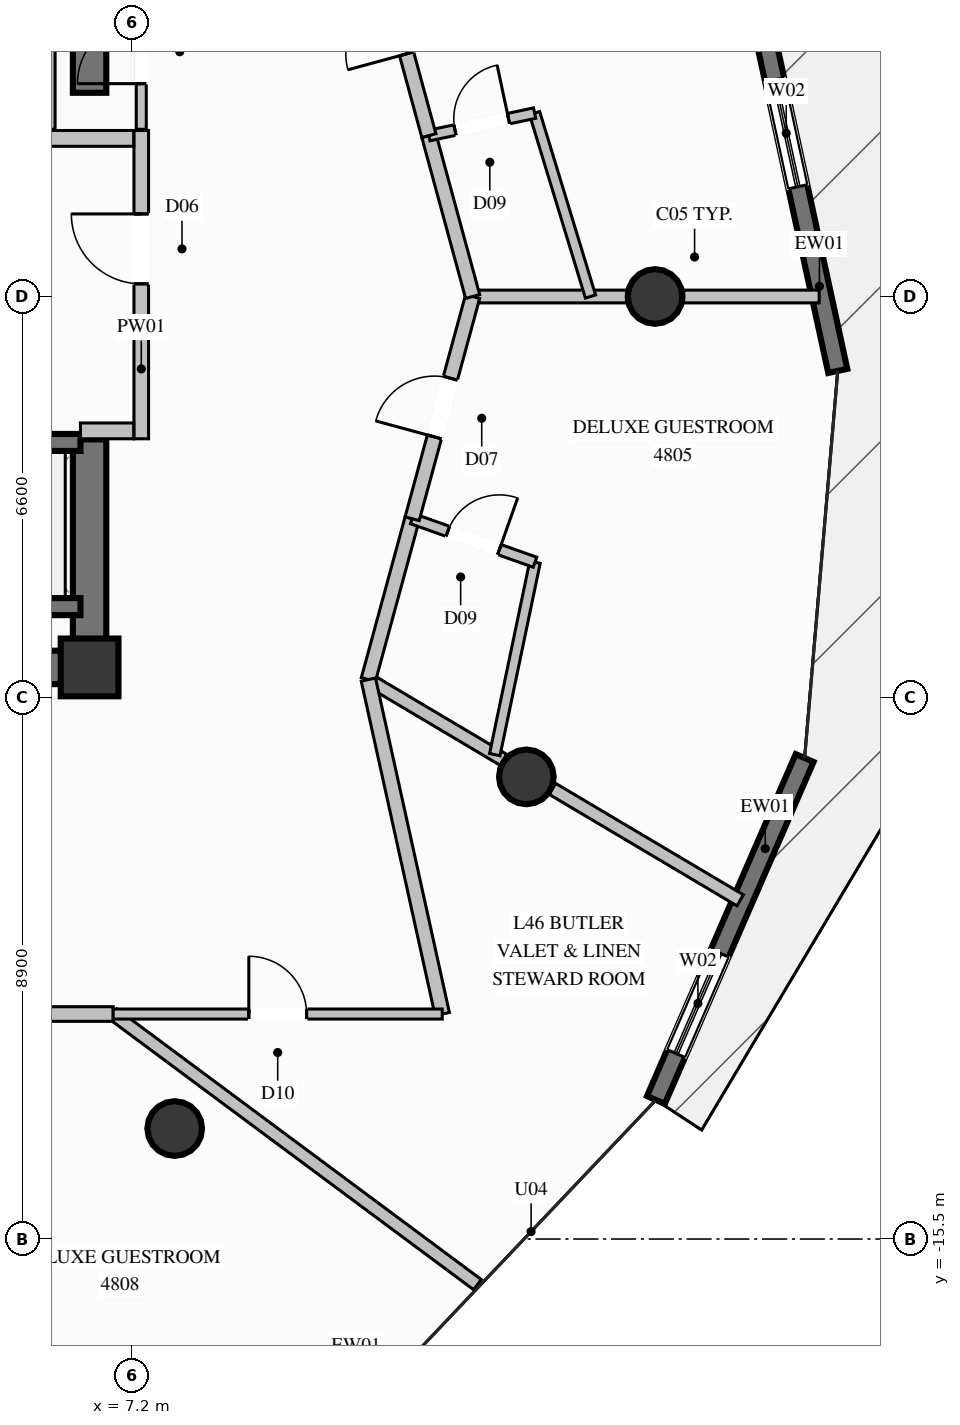
"""IFC4 building model, lengths in metres.
Left out: names, types, materials, properties, quantities, classifications, styles, units other than length and angle.
Written with IfcOpenShell. Run it as: python <this file> out.ifc"""

import sys

from ifc_helpers import new_model, si_unit, direction, frame, frame_2d, origin, origin_2d, place, context, subcontext, project, spatial, rectangle, circle, extrude, element, fill, save


model = new_model("IFC4")
c1 = context("Model", 3, precision=1e-05, world=origin(), true_north=direction((0.0, 1.0)))
c2 = subcontext(c1, "Body", "Model", "MODEL_VIEW")
j1 = project(units=[si_unit("LENGTHUNIT", "METRE"), si_unit("PLANEANGLEUNIT", "RADIAN")], contexts=[c1])
p1 = place(None, origin())
s1 = spatial("IfcSite", under=j1, at=p1, CompositionType="ELEMENT")
p2 = place(p1, origin())
s2 = spatial("IfcBuilding", under=s1, at=p2, CompositionType="ELEMENT")
p3 = place(p2, frame((0.0, 0.0, 180.4)))
s3 = spatial("IfcBuildingStorey", under=s2, at=p3, CompositionType="ELEMENT", Elevation=180.4)
p4 = place(p3, frame((6.5, -6.1, 0.0), z_axis=(0.0, 0.0, 1.0), x_axis=(1.0, 0.0, 0.0)))
e1 = element("IfcColumn", 1, at=p4, inside=s3, PredefinedType="COLUMN", context=c2, shape_type="SweptSolid", body=[
    extrude(rectangle(XDim=0.95, YDim=0.95, at=origin_2d()), origin(), (0.0, 0.0, 1.0), 3.6),
])
p5 = place(p3, frame((4.15, -6.1, 0.0), z_axis=(0.0, 0.0, 1.0), x_axis=(1.0, 0.0, 0.0)))
e2 = element("IfcWall", 2, at=p5, inside=s3, PredefinedType="SHEAR", context=c2, shape_type="SweptSolid", body=[
    extrude(rectangle(XDim=2.075, YDim=0.55, at=frame_2d((1.038, 0.0))), origin(), (0.0, 0.0, 1.0), 3.6),
])
p6 = place(p3, frame((6.5, -6.375, 0.0), z_axis=(0.0, 0.0, 1.0), x_axis=(0.0, 1.0, 0.0)))
e3 = element("IfcWall", 3, at=p6, inside=s3, PredefinedType="SHEAR", context=c2, shape_type="SweptSolid", body=[
    extrude(rectangle(XDim=4.025, YDim=0.55, at=frame_2d((2.012, 0.0))), origin(), (0.0, 0.0, 1.0), 3.6),
])
p7 = place(p3, frame((6.5, 3.35, 0.0), z_axis=(0.0, 0.0, 1.0), x_axis=(0.0, 1.0, 0.0)))
e4 = element("IfcWall", 4, at=p7, inside=s3, PredefinedType="SHEAR", context=c2, shape_type="SweptSolid", body=[
    extrude(rectangle(XDim=3.025, YDim=0.55, at=frame_2d((1.512, 0.0))), origin(), (0.0, 0.0, 1.0), 3.6),
])
for number, where, z_axis, x_axis in (
    (5, (15.8, 0.0, 0.0), (0.0, 0.0, 1.0), (1.0, 0.0, 0.0)),
    (6, (7.9, -13.683, 0.0), (0.0, 0.0, 1.0), (1.0, 0.0, 0.0)),
    (7, (13.683, -7.9, 0.0), (0.0, 0.0, 1.0), (1.0, 0.0, 0.0)),
):
    element("IfcColumn", number, at=place(p3, frame(where, z_axis=z_axis, x_axis=x_axis)), inside=s3, PredefinedType="COLUMN", context=c2, shape_type="SweptSolid", body=[
        extrude(circle(Radius=0.45, at=origin_2d()), origin(), (0.0, 0.0, 1.0), 3.6),
    ])
p8 = place(p3, frame((18.26, -7.59, 0.0), z_axis=(0.0, 0.0, 1.0), x_axis=(-0.398911001453, -0.916989647117, 0.0)))
e8 = element("IfcWall", 8, at=p8, inside=s3, PredefinedType="SOLIDWALL", context=c2, shape_type="SweptSolid", body=[
    extrude(rectangle(XDim=6.132, YDim=0.32, at=frame_2d((3.066, 0.0))), origin(), (0.0, 0.0, 1.0), 3.36),
])
p9 = place(p8, frame((3.5, 0.0, 0.35)))
e9 = element("IfcOpeningElement", 9, at=p9, cuts=e8, PredefinedType="OPENING", context=c2, shape_type="SweptSolid", body=[
    extrude(rectangle(XDim=1.8, YDim=2.6, at=frame_2d((0.9, 1.3))), frame((0.0, 0.17, 0.0), z_axis=(0.0, -1.0, 0.0), x_axis=(1.0, 0.0, 0.0)), (0.0, 0.0, 1.0), 0.34),
])
p10 = place(p3, frame((17.398, 5.262, 0.0), z_axis=(0.0, 0.0, 1.0), x_axis=(0.211992849193, -0.977271217161, 0.0)))
e10 = element("IfcWall", 10, at=p10, inside=s3, PredefinedType="SOLIDWALL", context=c2, shape_type="SweptSolid", body=[
    extrude(rectangle(XDim=6.637, YDim=0.32, at=frame_2d((3.318, 0.0))), origin(), (0.0, 0.0, 1.0), 3.36),
])
p11 = place(p10, frame((1.738, 0.0, 0.35)))
e11 = element("IfcOpeningElement", 11, at=p11, cuts=e10, PredefinedType="OPENING", context=c2, shape_type="SweptSolid", body=[
    extrude(rectangle(XDim=1.8, YDim=2.6, at=frame_2d((0.9, 1.3))), frame((0.0, 0.17, 0.0), z_axis=(0.0, -1.0, 0.0), x_axis=(1.0, 0.0, 0.0)), (0.0, 0.0, 1.0), 0.34),
])
p12 = place(p3, frame((4.15, -5.1, 0.0), z_axis=(0.0, 0.0, 1.0), x_axis=(1.0, 0.0, 0.0)))
e12 = element("IfcWall", 12, at=p12, inside=s3, PredefinedType="SOLIDWALL", context=c2, shape_type="SweptSolid", body=[
    extrude(rectangle(XDim=2.2, YDim=0.28, at=frame_2d((1.1, 0.0))), origin(), (0.0, 0.0, 1.0), 3.36),
])
p13 = place(p3, frame((6.35, -2.4, 0.0), z_axis=(0.0, 0.0, 1.0), x_axis=(-1.0, 0.0, 0.0)))
e13 = element("IfcWall", 13, at=p13, inside=s3, PredefinedType="SOLIDWALL", context=c2, shape_type="SweptSolid", body=[
    extrude(rectangle(XDim=2.2, YDim=0.28, at=frame_2d((1.1, 0.0))), origin(), (0.0, 0.0, 1.0), 3.36),
])
p14 = place(p13, frame((0.5, 0.0, 0.0)))
e14 = element("IfcOpeningElement", 14, at=p14, cuts=e13, PredefinedType="OPENING", context=c2, shape_type="SweptSolid", body=[
    extrude(rectangle(XDim=1.2, YDim=2.2, at=frame_2d((0.6, 1.1))), frame((0.0, 0.15, 0.0), z_axis=(0.0, -1.0, 0.0), x_axis=(1.0, 0.0, 0.0)), (0.0, 0.0, 1.0), 0.3),
])
p15 = place(p3, frame((7.35, -2.34, 0.0), z_axis=(0.0, 0.0, 1.0), x_axis=(0.0, 1.0, 0.0)))
e15 = element("IfcWall", 15, at=p15, inside=s3, PredefinedType="PARTITIONING", context=c2, shape_type="SweptSolid", body=[
    extrude(rectangle(XDim=5.07, YDim=0.24, at=frame_2d((2.535, 0.0))), origin(), (0.0, 0.0, 1.0), 2.445),
])
p16 = place(p15, frame((2.548, 0.0, 0.0)))
e16 = element("IfcOpeningElement", 16, at=p16, cuts=e15, PredefinedType="OPENING", context=c2, shape_type="SweptSolid", body=[
    extrude(rectangle(XDim=1.15, YDim=2.2, at=frame_2d((0.575, 1.1))), frame((0.0, 0.13, 0.0), z_axis=(0.0, -1.0, 0.0), x_axis=(1.0, 0.0, 0.0)), (0.0, 0.0, 1.0), 0.26),
])
p17 = place(p3, frame((6.35, -2.21, 0.0), z_axis=(0.0, 0.0, 1.0), x_axis=(1.0, 0.0, 0.0)))
e17 = element("IfcWall", 17, at=p17, inside=s3, PredefinedType="PARTITIONING", context=c2, shape_type="SweptSolid", body=[
    extrude(rectangle(XDim=0.875, YDim=0.26, at=frame_2d((0.438, 0.0))), origin(), (0.0, 0.0, 1.0), 3.36),
])
p18 = place(p3, frame((4.13, 2.6, 0.0), z_axis=(0.0, 0.0, 1.0), x_axis=(1.0, 0.0, 0.0)))
e18 = element("IfcWall", 18, at=p18, inside=s3, PredefinedType="PARTITIONING", context=c2, shape_type="SweptSolid", body=[
    extrude(rectangle(XDim=3.095, YDim=0.26, at=frame_2d((1.548, 0.0))), origin(), (0.0, 0.0, 1.0), 3.36),
])
p19 = place(p3, frame((7.35, 2.75, 0.0), z_axis=(0.0, 0.0, 1.0), x_axis=(0.0, 1.0, 0.0)))
e19 = element("IfcWall", 19, at=p19, inside=s3, PredefinedType="PARTITIONING", context=c2, shape_type="SweptSolid", body=[
    extrude(rectangle(XDim=2.55, YDim=0.165, at=frame_2d((1.275, 0.0))), origin(), (0.0, 0.0, 1.0), 3.36),
])
p20 = place(p19, frame((0.75, 0.0, 0.0)))
e20 = element("IfcOpeningElement", 20, at=p20, cuts=e19, PredefinedType="OPENING", context=c2, shape_type="SweptSolid", body=[
    extrude(rectangle(XDim=1.05, YDim=2.15, at=frame_2d((0.525, 1.075))), frame((0.0, 0.093, 0.0), z_axis=(0.0, -1.0, 0.0), x_axis=(1.0, 0.0, 0.0)), (0.0, 0.0, 1.0), 0.185),
])
p21 = place(p3, frame((5.85, 5.3, 0.0), z_axis=(0.0, 0.0, 1.0), x_axis=(0.0, -1.0, 0.0)))
e21 = element("IfcWall", 21, at=p21, inside=s3, PredefinedType="PARTITIONING", context=c2, shape_type="SweptSolid", body=[
    extrude(rectangle(XDim=2.55, YDim=0.165, at=frame_2d((1.275, 0.0))), origin(), (0.0, 0.0, 1.0), 2.445),
])
p22 = place(p3, frame((12.8, 0.0, 0.0), z_axis=(0.0, 0.0, 1.0), x_axis=(1.0, 0.0, 0.0)))
e22 = element("IfcWall", 22, at=p22, inside=s3, PredefinedType="PARTITIONING", context=c2, shape_type="SweptSolid", body=[
    extrude(rectangle(XDim=2.53, YDim=0.21, at=frame_2d((1.265, 0.0))), origin(), (0.0, 0.0, 1.0), 3.36),
])
p23 = place(p3, frame((16.27, 0.0, 0.0), z_axis=(0.0, 0.0, 1.0), x_axis=(1.0, 0.0, 0.0)))
e23 = element("IfcWall", 23, at=p23, inside=s3, PredefinedType="PARTITIONING", context=c2, shape_type="SweptSolid", body=[
    extrude(rectangle(XDim=2.229, YDim=0.21, at=frame_2d((1.115, 0.0))), origin(), (0.0, 0.0, 1.0), 3.36),
])
p24 = place(p3, frame((11.085, -6.3, 0.0), z_axis=(0.0, 0.0, 1.0), x_axis=(0.859827513331, -0.510584613281, 0.0)))
e24 = element("IfcWall", 24, at=p24, inside=s3, PredefinedType="PARTITIONING", context=c2, shape_type="SweptSolid", body=[
    extrude(rectangle(XDim=2.583, YDim=0.21, at=frame_2d((1.292, 0.0))), origin(), (0.0, 0.0, 1.0), 2.801),
])
p25 = place(p3, frame((14.11, -8.096, 0.0), z_axis=(0.0, 0.0, 1.0), x_axis=(0.859858473155, -0.510532473153, 0.0)))
e25 = element("IfcWall", 25, at=p25, inside=s3, PredefinedType="PARTITIONING", context=c2, shape_type="SweptSolid", body=[
    extrude(rectangle(XDim=3.592, YDim=0.21, at=frame_2d((1.796, 0.0))), origin(), (0.0, 0.0, 1.0), 3.36),
])
p26 = place(p3, frame((11.085, -6.3, 0.0), z_axis=(0.0, 0.0, 1.0), x_axis=(0.262552356383, 0.964917747872, 0.0)))
e26 = element("IfcWall", 26, at=p26, inside=s3, PredefinedType="PARTITIONING", context=c2, shape_type="SweptSolid", body=[
    extrude(rectangle(XDim=2.742, YDim=0.24, at=frame_2d((1.371, 0.0))), origin(), (0.0, 0.0, 1.0), 3.36),
])
p27 = place(p3, frame((13.164, -7.534, 0.0), z_axis=(0.0, 0.0, 1.0), x_axis=(0.204476064812, 0.978871564057, 0.0)))
e27 = element("IfcWall", 27, at=p27, inside=s3, PredefinedType="PLUMBINGWALL", context=c2, shape_type="SweptSolid", body=[
    extrude(rectangle(XDim=3.232, YDim=0.175, at=frame_2d((1.616, 0.0))), origin(), (0.0, 0.0, 1.0), 2.929),
])
p28 = place(p3, frame((11.805, -3.654, 0.0), z_axis=(0.0, 0.0, 1.0), x_axis=(0.942533085892, -0.334112828248, 0.0)))
e28 = element("IfcWall", 28, at=p28, inside=s3, PredefinedType="PLUMBINGWALL", context=c2, shape_type="SweptSolid", body=[
    extrude(rectangle(XDim=2.143, YDim=0.175, at=frame_2d((1.072, 0.0))), origin(), (0.0, 0.0, 1.0), 3.36),
])
p29 = place(p28, frame((0.622, 0.0, 0.0)))
e29 = element("IfcOpeningElement", 29, at=p29, cuts=e28, PredefinedType="OPENING", context=c2, shape_type="SweptSolid", body=[
    extrude(rectangle(XDim=0.9, YDim=2.1, at=frame_2d((0.45, 1.05))), frame((0.0, 0.098, 0.0), z_axis=(0.0, -1.0, 0.0), x_axis=(1.0, 0.0, 0.0)), (0.0, 0.0, 1.0), 0.195),
])
p30 = place(p3, frame((11.805, -3.654, 0.0), z_axis=(0.0, 0.0, 1.0), x_axis=(0.262762825819, 0.964860454868, 0.0)))
e30 = element("IfcWall", 30, at=p30, inside=s3, PredefinedType="PARTITIONING", context=c2, shape_type="SweptSolid", body=[
    extrude(rectangle(XDim=3.787, YDim=0.24, at=frame_2d((1.894, 0.0))), origin(), (0.0, 0.0, 1.0), 3.36),
])
p31 = place(p30, frame((1.394, 0.0, 0.0)))
e31 = element("IfcOpeningElement", 31, at=p31, cuts=e30, PredefinedType="OPENING", context=c2, shape_type="SweptSolid", body=[
    extrude(rectangle(XDim=1.0, YDim=2.2, at=frame_2d((0.5, 1.1))), frame((0.0, 0.13, 0.0), z_axis=(0.0, -1.0, 0.0), x_axis=(1.0, 0.0, 0.0)), (0.0, 0.0, 1.0), 0.26),
])
p32 = place(p3, frame((12.8, 0.0, 0.0), z_axis=(0.0, 0.0, 1.0), x_axis=(-0.262552356383, 0.964917747872, 0.0)))
e32 = element("IfcWall", 32, at=p32, inside=s3, PredefinedType="PARTITIONING", context=c2, shape_type="SweptSolid", body=[
    extrude(rectangle(XDim=2.742, YDim=0.24, at=frame_2d((1.371, 0.0))), origin(), (0.0, 0.0, 1.0), 3.36),
])
p33 = place(p3, frame((14.738, 0.0, 0.0), z_axis=(0.0, 0.0, 1.0), x_axis=(-0.291451232832, 0.956585688206, 0.0)))
e33 = element("IfcWall", 33, at=p33, inside=s3, PredefinedType="PLUMBINGWALL", context=c2, shape_type="SweptSolid", body=[
    extrude(rectangle(XDim=3.153, YDim=0.175, at=frame_2d((1.577, 0.0))), origin(), (0.0, 0.0, 1.0), 3.36),
])
p34 = place(p3, frame((12.08, 2.646, 0.0), z_axis=(0.0, 0.0, 1.0), x_axis=(0.978092843795, 0.208169135363, 0.0)))
e34 = element("IfcWall", 34, at=p34, inside=s3, PredefinedType="PLUMBINGWALL", context=c2, shape_type="SweptSolid", body=[
    extrude(rectangle(XDim=1.778, YDim=0.175, at=frame_2d((0.889, 0.0))), origin(), (0.0, 0.0, 1.0), 3.36),
])
p35 = place(p34, frame((0.439, 0.0, 0.0)))
e35 = element("IfcOpeningElement", 35, at=p35, cuts=e34, PredefinedType="OPENING", context=c2, shape_type="SweptSolid", body=[
    extrude(rectangle(XDim=0.9, YDim=2.1, at=frame_2d((0.45, 1.05))), frame((0.0, 0.098, 0.0), z_axis=(0.0, -1.0, 0.0), x_axis=(1.0, 0.0, 0.0)), (0.0, 0.0, 1.0), 0.195),
])
p36 = place(p3, frame((12.08, 2.646, 0.0), z_axis=(0.0, 0.0, 1.0), x_axis=(-0.262762825819, 0.964860454868, 0.0)))
e36 = element("IfcWall", 36, at=p36, inside=s3, PredefinedType="PARTITIONING", context=c2, shape_type="SweptSolid", body=[
    extrude(rectangle(XDim=3.787, YDim=0.24, at=frame_2d((1.894, 0.0))), origin(), (0.0, 0.0, 1.0), 3.36),
])
p37 = place(p36, frame((1.394, 0.0, 0.0)))
e37 = element("IfcOpeningElement", 37, at=p37, cuts=e36, PredefinedType="OPENING", context=c2, shape_type="SweptSolid", body=[
    extrude(rectangle(XDim=1.0, YDim=2.2, at=frame_2d((0.5, 1.1))), frame((0.0, 0.13, 0.0), z_axis=(0.0, -1.0, 0.0), x_axis=(1.0, 0.0, 0.0)), (0.0, 0.0, 1.0), 0.26),
])
p38 = place(p3, frame((6.888, -11.8, 0.0), z_axis=(0.0, 0.0, 1.0), x_axis=(0.802774719759, -0.596282440892, 0.0)))
e38 = element("IfcWall", 38, at=p38, inside=s3, PredefinedType="PARTITIONING", context=c2, shape_type="SweptSolid", body=[
    extrude(rectangle(XDim=7.463, YDim=0.21, at=frame_2d((3.731, 0.0))), origin(), (0.0, 0.0, 1.0), 3.36),
])
p39 = place(p3, frame((3.031, -11.8, 0.0), z_axis=(0.0, 0.0, 1.0), x_axis=(1.0, 0.0, 0.0)))
e39 = element("IfcWall", 39, at=p39, inside=s3, PredefinedType="PARTITIONING", context=c2, shape_type="SweptSolid", body=[
    extrude(rectangle(XDim=3.857, YDim=0.24, at=frame_2d((1.928, 0.0))), origin(), (0.0, 0.0, 1.0), 3.36),
])
p40 = place(p39, frame((1.428, 0.0, 0.0)))
e40 = element("IfcOpeningElement", 40, at=p40, cuts=e39, PredefinedType="OPENING", context=c2, shape_type="SweptSolid", body=[
    extrude(rectangle(XDim=1.0, YDim=2.2, at=frame_2d((0.5, 1.1))), frame((0.0, 0.13, 0.0), z_axis=(0.0, -1.0, 0.0), x_axis=(1.0, 0.0, 0.0)), (0.0, 0.0, 1.0), 0.26),
])
p41 = place(p3, frame((12.3, -11.8, 0.0), z_axis=(0.0, 0.0, 1.0), x_axis=(-0.21572328796, 0.976454537104, 0.0)))
e41 = element("IfcWall", 41, at=p41, inside=s3, PredefinedType="PARTITIONING", context=c2, shape_type="SweptSolid", body=[
    extrude(rectangle(XDim=5.633, YDim=0.24, at=frame_2d((2.816, 0.0))), origin(), (0.0, 0.0, 1.0), 3.36),
])
p42 = place(p3, frame((6.888, -11.8, 0.0), z_axis=(0.0, 0.0, 1.0), x_axis=(1.0, 0.0, 0.0)))
e42 = element("IfcWall", 42, at=p42, inside=s3, PredefinedType="PARTITIONING", context=c2, shape_type="SweptSolid", body=[
    extrude(rectangle(XDim=5.412, YDim=0.165, at=frame_2d((2.706, 0.0))), origin(), (0.0, 0.0, 1.0), 3.36),
])
p43 = place(p42, frame((2.231, 0.0, 0.0)))
e43 = element("IfcOpeningElement", 43, at=p43, cuts=e42, PredefinedType="OPENING", context=c2, shape_type="SweptSolid", body=[
    extrude(rectangle(XDim=0.95, YDim=2.1, at=frame_2d((0.475, 1.05))), frame((0.0, 0.093, 0.0), z_axis=(0.0, -1.0, 0.0), x_axis=(1.0, 0.0, 0.0)), (0.0, 0.0, 1.0), 0.185),
])
p44 = place(p9, origin())
e44 = element("IfcWindow", 44, at=p44, inside=s3, PartitioningType="SINGLE_PANEL", PredefinedType="WINDOW", context=c2, shape_type="SweptSolid", body=[
    extrude(rectangle(XDim=1.8, YDim=2.6, at=frame_2d((0.9, 1.3))), frame((0.0, 0.03, 0.0), z_axis=(0.0, -1.0, 0.0), x_axis=(1.0, 0.0, 0.0)), (0.0, 0.0, 1.0), 0.06),
])
fill(e9, e44)
p45 = place(p11, origin())
e45 = element("IfcWindow", 45, at=p45, inside=s3, PartitioningType="SINGLE_PANEL", PredefinedType="WINDOW", context=c2, shape_type="SweptSolid", body=[
    extrude(rectangle(XDim=1.8, YDim=2.6, at=frame_2d((0.9, 1.3))), frame((0.0, 0.03, 0.0), z_axis=(0.0, -1.0, 0.0), x_axis=(1.0, 0.0, 0.0)), (0.0, 0.0, 1.0), 0.06),
])
fill(e11, e45)
p46 = place(p16, origin())
e46 = element("IfcDoor", 46, at=p46, inside=s3, OperationType="SINGLE_SWING_RIGHT", PredefinedType="DOOR", context=c2, shape_type="SweptSolid", body=[
    extrude(rectangle(XDim=1.15, YDim=2.2, at=frame_2d((0.575, 1.1))), frame((0.0, 0.025, 0.0), z_axis=(0.0, -1.0, 0.0), x_axis=(1.0, 0.0, 0.0)), (0.0, 0.0, 1.0), 0.05),
])
fill(e16, e46)
p47 = place(p20, origin())
e47 = element("IfcDoor", 47, at=p47, inside=s3, OperationType="SINGLE_SWING_LEFT", PredefinedType="DOOR", context=c2, shape_type="SweptSolid", body=[
    extrude(rectangle(XDim=1.05, YDim=2.15, at=frame_2d((0.525, 1.075))), frame((0.0, 0.025, 0.0), z_axis=(0.0, -1.0, 0.0), x_axis=(1.0, 0.0, 0.0)), (0.0, 0.0, 1.0), 0.05),
])
fill(e20, e47)
p48 = place(p29, origin())
e48 = element("IfcDoor", 48, at=p48, inside=s3, OperationType="SINGLE_SWING_RIGHT", PredefinedType="DOOR", context=c2, shape_type="SweptSolid", body=[
    extrude(rectangle(XDim=0.9, YDim=2.1, at=frame_2d((0.45, 1.05))), frame((0.0, 0.025, 0.0), z_axis=(0.0, -1.0, 0.0), x_axis=(1.0, 0.0, 0.0)), (0.0, 0.0, 1.0), 0.05),
])
fill(e29, e48)
p49 = place(p31, origin())
e49 = element("IfcDoor", 49, at=p49, inside=s3, OperationType="SINGLE_SWING_LEFT", PredefinedType="DOOR", context=c2, shape_type="SweptSolid", body=[
    extrude(rectangle(XDim=1.0, YDim=2.2, at=frame_2d((0.5, 1.1))), frame((0.0, 0.025, 0.0), z_axis=(0.0, -1.0, 0.0), x_axis=(1.0, 0.0, 0.0)), (0.0, 0.0, 1.0), 0.05),
])
fill(e31, e49)
p50 = place(p35, origin())
e50 = element("IfcDoor", 50, at=p50, inside=s3, OperationType="SINGLE_SWING_RIGHT", PredefinedType="DOOR", context=c2, shape_type="SweptSolid", body=[
    extrude(rectangle(XDim=0.9, YDim=2.1, at=frame_2d((0.45, 1.05))), frame((0.0, 0.025, 0.0), z_axis=(0.0, -1.0, 0.0), x_axis=(1.0, 0.0, 0.0)), (0.0, 0.0, 1.0), 0.05),
])
fill(e35, e50)
p51 = place(p37, origin())
e51 = element("IfcDoor", 51, at=p51, inside=s3, OperationType="SINGLE_SWING_LEFT", PredefinedType="DOOR", context=c2, shape_type="SweptSolid", body=[
    extrude(rectangle(XDim=1.0, YDim=2.2, at=frame_2d((0.5, 1.1))), frame((0.0, 0.025, 0.0), z_axis=(0.0, -1.0, 0.0), x_axis=(1.0, 0.0, 0.0)), (0.0, 0.0, 1.0), 0.05),
])
fill(e37, e51)
p52 = place(p43, origin())
e52 = element("IfcDoor", 52, at=p52, inside=s3, OperationType="SINGLE_SWING_LEFT", PredefinedType="DOOR", context=c2, shape_type="SweptSolid", body=[
    extrude(rectangle(XDim=0.95, YDim=2.1, at=frame_2d((0.475, 1.05))), frame((0.0, 0.025, 0.0), z_axis=(0.0, -1.0, 0.0), x_axis=(1.0, 0.0, 0.0)), (0.0, 0.0, 1.0), 0.05),
])
fill(e43, e52)
save(model, sys.argv[1])
